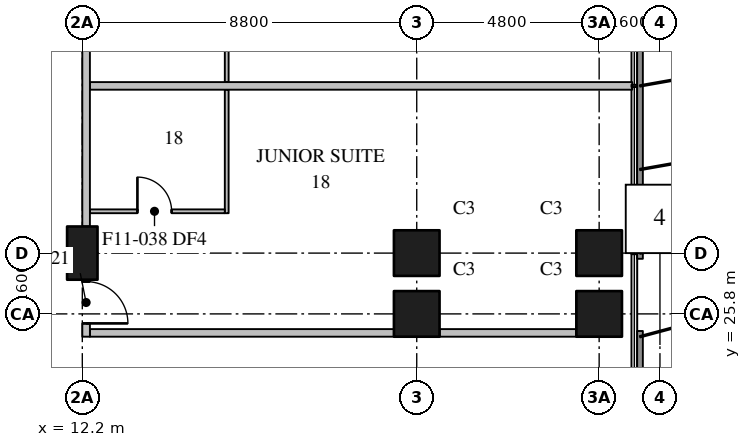
"""IFC4 building model, lengths in metres.
Left out: names, types, materials, properties, quantities, classifications, styles, units other than length and angle.
Written with IfcOpenShell. Run it as: python <this file> out.ifc"""

import sys

from ifc_helpers import new_model, si_unit, direction, frame, frame_2d, origin, origin_2d, place, context, subcontext, project, spatial, rectangle, extrude, element, fill, save


model = new_model("IFC4")
c1 = context("Model", 3, precision=1e-05, world=origin(), true_north=direction((0.0, 1.0)))
c2 = subcontext(c1, "Body", "Model", "MODEL_VIEW")
j1 = project(units=[si_unit("LENGTHUNIT", "METRE"), si_unit("PLANEANGLEUNIT", "RADIAN")], contexts=[c1])
p1 = place(None, origin())
s1 = spatial("IfcSite", under=j1, at=p1, CompositionType="ELEMENT")
p2 = place(p1, origin())
s2 = spatial("IfcBuilding", under=s1, at=p2, CompositionType="ELEMENT")
p3 = place(p2, frame((0.0, 0.0, 107.4)))
s3 = spatial("IfcBuildingStorey", under=s2, at=p3, CompositionType="ELEMENT", Elevation=107.4)
p4 = place(p3, frame((12.2, 27.4, 0.0), z_axis=(0.0, 0.0, 1.0), x_axis=(0.0, 1.0, 0.0)))
e1 = element("IfcColumn", 1, at=p4, inside=s3, PredefinedType="COLUMN", context=c2, shape_type="SweptSolid", body=[
    extrude(rectangle(XDim=1.4, YDim=0.8, at=origin_2d()), origin(), (0.0, 0.0, 1.0), 3.7),
])
for number, where, z_axis, x_axis in (
    (2, (21.0, 25.8, 0.0), (0.0, 0.0, 1.0), (1.0, 0.0, 0.0)),
    (3, (21.0, 27.4, 0.0), (0.0, 0.0, 1.0), (1.0, 0.0, 0.0)),
    (4, (25.8, 25.8, 0.0), (0.0, 0.0, 1.0), (1.0, 0.0, 0.0)),
    (5, (25.8, 27.4, 0.0), (0.0, 0.0, 1.0), (1.0, 0.0, 0.0)),
):
    element("IfcColumn", number, at=place(p3, frame(where, z_axis=z_axis, x_axis=x_axis)), inside=s3, PredefinedType="COLUMN", context=c2, shape_type="SweptSolid", body=[
        extrude(rectangle(XDim=1.2, YDim=1.2, at=origin_2d()), origin(), (0.0, 0.0, 1.0), 3.7),
    ])
p5 = place(p3, frame((12.3, 26.7, 0.0), z_axis=(0.0, 0.0, 1.0), x_axis=(0.0, -1.0, 0.0)))
e6 = element("IfcWall", 6, at=p5, inside=s3, PredefinedType="PARTITIONING", context=c2, shape_type="SweptSolid", body=[
    extrude(rectangle(XDim=1.5, YDim=0.2, at=frame_2d((0.75, 0.0))), origin(), (0.0, 0.0, 1.0), 3.4),
])
p6 = place(p5, frame((0.05, 0.0, 0.0)))
e7 = element("IfcOpeningElement", 7, at=p6, cuts=e6, PredefinedType="OPENING", context=c2, shape_type="SweptSolid", body=[
    extrude(rectangle(XDim=1.1, YDim=2.1, at=frame_2d((0.55, 1.05))), frame((0.0, 0.11, 0.0), z_axis=(0.0, -1.0, 0.0), x_axis=(1.0, 0.0, 0.0)), (0.0, 0.0, 1.0), 0.22),
])
p7 = place(p3, frame((12.3, 28.1, 0.0), z_axis=(0.0, 0.0, 1.0), x_axis=(0.0, 1.0, 0.0)))
e8 = element("IfcWall", 8, at=p7, inside=s3, PredefinedType="PARTITIONING", context=c2, shape_type="SweptSolid", body=[
    extrude(rectangle(XDim=7.4, YDim=0.2, at=frame_2d((3.7, 0.0))), origin(), (0.0, 0.0, 1.0), 3.4),
])
p8 = place(p3, frame((12.4, 25.3, 0.0), z_axis=(0.0, 0.0, 1.0), x_axis=(1.0, 0.0, 0.0)))
e9 = element("IfcWall", 9, at=p8, inside=s3, PredefinedType="PARTITIONING", context=c2, shape_type="SweptSolid", body=[
    extrude(rectangle(XDim=8.0, YDim=0.2, at=frame_2d((4.0, 0.0))), origin(), (0.0, 0.0, 1.0), 3.4),
])
p9 = place(p3, frame((21.6, 25.3, 0.0), z_axis=(0.0, 0.0, 1.0), x_axis=(1.0, 0.0, 0.0)))
e10 = element("IfcWall", 10, at=p9, inside=s3, PredefinedType="PARTITIONING", context=c2, shape_type="SweptSolid", body=[
    extrude(rectangle(XDim=3.6, YDim=0.2, at=frame_2d((1.8, 0.0))), origin(), (0.0, 0.0, 1.0), 3.4),
])
p10 = place(p3, frame((12.4, 31.8, 0.0), z_axis=(0.0, 0.0, 1.0), x_axis=(1.0, 0.0, 0.0)))
e11 = element("IfcWall", 11, at=p10, inside=s3, PredefinedType="PARTITIONING", context=c2, shape_type="SweptSolid", body=[
    extrude(rectangle(XDim=14.27, YDim=0.2, at=frame_2d((7.135, 0.0))), origin(), (0.0, 0.0, 1.0), 3.4),
])
for number, where, z_axis, x_axis in (
    (12, (16.0, 28.45, 0.0), (0.0, 0.0, 1.0), (0.0, 1.0, 0.0)),
    (13, (16.0, 31.9, 0.0), (0.0, 0.0, 1.0), (0.0, 1.0, 0.0)),
):
    element("IfcWall", number, at=place(p3, frame(where, z_axis=z_axis, x_axis=x_axis)), inside=s3, PredefinedType="PARTITIONING", context=c2, shape_type="SweptSolid", body=[
        extrude(rectangle(XDim=3.25, YDim=0.1, at=frame_2d((1.625, 0.0))), origin(), (0.0, 0.0, 1.0), 3.4),
    ])
p11 = place(p3, frame((12.4, 28.5, 0.0), z_axis=(0.0, 0.0, 1.0), x_axis=(1.0, 0.0, 0.0)))
e14 = element("IfcWall", 14, at=p11, inside=s3, PredefinedType="PARTITIONING", context=c2, shape_type="SweptSolid", body=[
    extrude(rectangle(XDim=3.55, YDim=0.1, at=frame_2d((1.775, 0.0))), origin(), (0.0, 0.0, 1.0), 3.4),
])
p12 = place(p11, frame((1.25, 0.0, 0.0)))
e15 = element("IfcOpeningElement", 15, at=p12, cuts=e14, PredefinedType="OPENING", context=c2, shape_type="SweptSolid", body=[
    extrude(rectangle(XDim=0.9, YDim=2.1, at=frame_2d((0.45, 1.05))), frame((0.0, 0.06, 0.0), z_axis=(0.0, -1.0, 0.0), x_axis=(1.0, 0.0, 0.0)), (0.0, 0.0, 1.0), 0.12),
])
p13 = place(p6, origin())
e16 = element("IfcDoor", 16, at=p13, inside=s3, OperationType="SINGLE_SWING_RIGHT", PredefinedType="DOOR", context=c2, shape_type="SweptSolid", body=[
    extrude(rectangle(XDim=1.1, YDim=2.1, at=frame_2d((0.55, 1.05))), frame((0.0, 0.025, 0.0), z_axis=(0.0, -1.0, 0.0), x_axis=(1.0, 0.0, 0.0)), (0.0, 0.0, 1.0), 0.05),
])
fill(e7, e16)
p14 = place(p12, origin())
e17 = element("IfcDoor", 17, at=p14, inside=s3, OperationType="SINGLE_SWING_LEFT", PredefinedType="DOOR", context=c2, shape_type="SweptSolid", body=[
    extrude(rectangle(XDim=0.9, YDim=2.1, at=frame_2d((0.45, 1.05))), frame((0.0, 0.025, 0.0), z_axis=(0.0, -1.0, 0.0), x_axis=(1.0, 0.0, 0.0)), (0.0, 0.0, 1.0), 0.05),
])
fill(e15, e17)
save(model, sys.argv[1])
